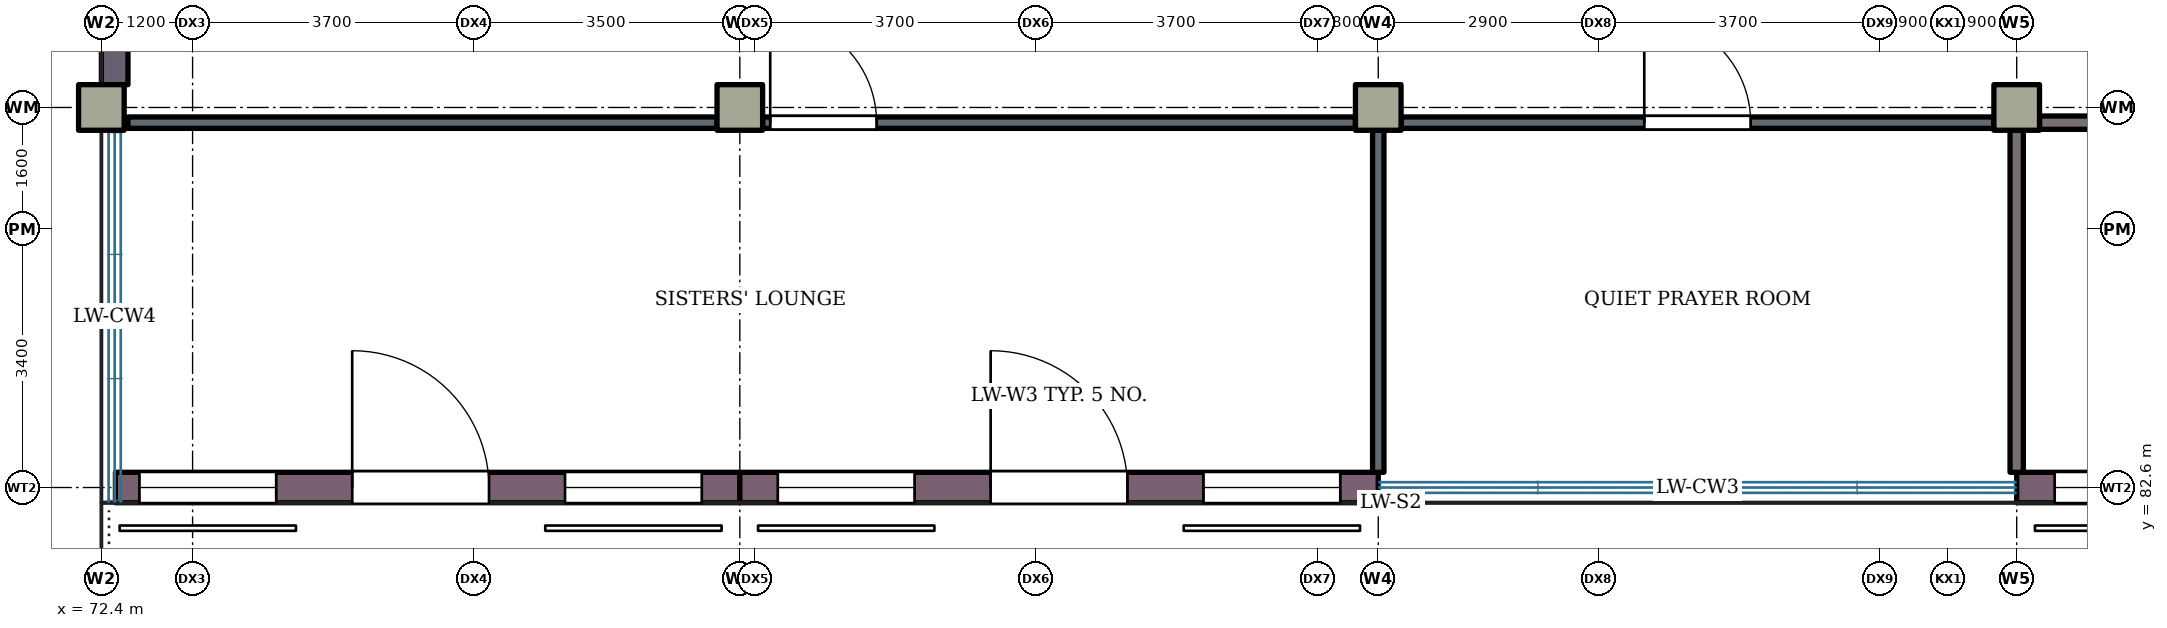
"""IFC4 building model, lengths in metres.
Left out: names, types, materials, properties, quantities, classifications, styles, units other than length and angle.
Written with IfcOpenShell. Run it as: python <this file> out.ifc"""

import sys

from ifc_helpers import new_model, si_unit, direction, frame, frame_2d, origin, origin_2d, place, context, subcontext, project, spatial, rectangle, extrude, element, fill, save


model = new_model("IFC4")
c1 = context("Model", 3, precision=1e-05, world=origin(), true_north=direction((0.0, 1.0)))
c2 = subcontext(c1, "Body", "Model", "MODEL_VIEW")
j1 = project(units=[si_unit("LENGTHUNIT", "METRE"), si_unit("PLANEANGLEUNIT", "RADIAN")], contexts=[c1])
p1 = place(None, origin())
s1 = spatial("IfcSite", under=j1, at=p1, CompositionType="ELEMENT")
p2 = place(p1, origin())
s2 = spatial("IfcBuilding", under=s1, at=p2, CompositionType="ELEMENT")
p3 = place(p2, frame((0.0, 0.0, 12.6)))
s3 = spatial("IfcBuildingStorey", under=s2, at=p3, CompositionType="ELEMENT", Elevation=12.6)
for number, where, z_axis, x_axis in (
    (1, (72.4, 87.6, 0.0), (0.0, 0.0, 1.0), (1.0, 0.0, 0.0)),
    (2, (80.8, 87.6, 0.0), (0.0, 0.0, 1.0), (1.0, 0.0, 0.0)),
    (3, (89.2, 87.6, 0.0), (0.0, 0.0, 1.0), (1.0, 0.0, 0.0)),
    (4, (97.6, 87.6, 0.0), (0.0, 0.0, 1.0), (1.0, 0.0, 0.0)),
):
    element("IfcColumn", number, at=place(p3, frame(where, z_axis=z_axis, x_axis=x_axis)), inside=s3, PredefinedType="COLUMN", context=c2, shape_type="SweptSolid", body=[
        extrude(rectangle(XDim=0.6, YDim=0.6, at=origin_2d()), origin(), (0.0, 0.0, 1.0), 4.2),
    ])
p4 = place(p3, frame((72.575, 87.9, 0.0), z_axis=(0.0, 0.0, 1.0), x_axis=(0.0, 1.0, 0.0)))
e5 = element("IfcWall", 5, at=p4, inside=s3, PredefinedType="SHEAR", context=c2, shape_type="SweptSolid", body=[
    extrude(rectangle(XDim=9.6, YDim=0.35, at=frame_2d((4.8, 0.0))), origin(), (0.0, 0.0, 1.0), 4.2),
])
p5 = place(p4, frame((5.3, 0.0, 0.9)))
e6 = element("IfcOpeningElement", 6, at=p5, cuts=e5, PredefinedType="OPENING", context=c2, shape_type="SweptSolid", body=[
    extrude(rectangle(XDim=1.8, YDim=2.1, at=frame_2d((0.9, 1.05))), frame((0.0, 0.185, 0.0), z_axis=(0.0, -1.0, 0.0), x_axis=(1.0, 0.0, 0.0)), (0.0, 0.0, 1.0), 0.37),
])
p6 = place(p3, frame((72.585, 82.6, 0.0), z_axis=(0.0, 0.0, 1.0), x_axis=(1.0, 0.0, 0.0)))
e7 = element("IfcWall", 7, at=p6, inside=s3, PredefinedType="SOLIDWALL", context=c2, shape_type="SweptSolid", body=[
    extrude(rectangle(XDim=8.215, YDim=0.4, at=frame_2d((4.107, 0.0))), origin(), (0.0, 0.0, 1.0), 3.32),
])
p7 = place(p6, frame((3.115, 0.0, 0.0)))
e8 = element("IfcOpeningElement", 8, at=p7, cuts=e7, PredefinedType="OPENING", context=c2, shape_type="SweptSolid", body=[
    extrude(rectangle(XDim=1.8, YDim=2.4, at=frame_2d((0.9, 1.2))), frame((0.0, 0.21, 0.0), z_axis=(0.0, -1.0, 0.0), x_axis=(1.0, 0.0, 0.0)), (0.0, 0.0, 1.0), 0.42),
])
p8 = place(p6, frame((0.315, 0.0, 0.9)))
e9 = element("IfcOpeningElement", 9, at=p8, cuts=e7, PredefinedType="OPENING", context=c2, shape_type="SweptSolid", body=[
    extrude(rectangle(XDim=1.8, YDim=1.9, at=frame_2d((0.9, 0.95))), frame((0.0, 0.21, 0.0), z_axis=(0.0, -1.0, 0.0), x_axis=(1.0, 0.0, 0.0)), (0.0, 0.0, 1.0), 0.42),
])
p9 = place(p6, frame((5.915, 0.0, 0.9)))
e10 = element("IfcOpeningElement", 10, at=p9, cuts=e7, PredefinedType="OPENING", context=c2, shape_type="SweptSolid", body=[
    extrude(rectangle(XDim=1.8, YDim=1.9, at=frame_2d((0.9, 0.95))), frame((0.0, 0.21, 0.0), z_axis=(0.0, -1.0, 0.0), x_axis=(1.0, 0.0, 0.0)), (0.0, 0.0, 1.0), 0.42),
])
p10 = place(p3, frame((80.8, 82.6, 0.0), z_axis=(0.0, 0.0, 1.0), x_axis=(1.0, 0.0, 0.0)))
e11 = element("IfcWall", 11, at=p10, inside=s3, PredefinedType="SOLIDWALL", context=c2, shape_type="SweptSolid", body=[
    extrude(rectangle(XDim=8.4, YDim=0.4, at=frame_2d((4.2, 0.0))), origin(), (0.0, 0.0, 1.0), 3.32),
])
p11 = place(p10, frame((3.3, 0.0, 0.0)))
e12 = element("IfcOpeningElement", 12, at=p11, cuts=e11, PredefinedType="OPENING", context=c2, shape_type="SweptSolid", body=[
    extrude(rectangle(XDim=1.8, YDim=2.4, at=frame_2d((0.9, 1.2))), frame((0.0, 0.21, 0.0), z_axis=(0.0, -1.0, 0.0), x_axis=(1.0, 0.0, 0.0)), (0.0, 0.0, 1.0), 0.42),
])
p12 = place(p10, frame((0.5, 0.0, 0.9)))
e13 = element("IfcOpeningElement", 13, at=p12, cuts=e11, PredefinedType="OPENING", context=c2, shape_type="SweptSolid", body=[
    extrude(rectangle(XDim=1.8, YDim=1.9, at=frame_2d((0.9, 0.95))), frame((0.0, 0.21, 0.0), z_axis=(0.0, -1.0, 0.0), x_axis=(1.0, 0.0, 0.0)), (0.0, 0.0, 1.0), 0.42),
])
p13 = place(p10, frame((6.1, 0.0, 0.9)))
e14 = element("IfcOpeningElement", 14, at=p13, cuts=e11, PredefinedType="OPENING", context=c2, shape_type="SweptSolid", body=[
    extrude(rectangle(XDim=1.8, YDim=1.9, at=frame_2d((0.9, 0.95))), frame((0.0, 0.21, 0.0), z_axis=(0.0, -1.0, 0.0), x_axis=(1.0, 0.0, 0.0)), (0.0, 0.0, 1.0), 0.42),
])
p14 = place(p3, frame((97.6, 82.6, 0.0), z_axis=(0.0, 0.0, 1.0), x_axis=(1.0, 0.0, 0.0)))
e15 = element("IfcWall", 15, at=p14, inside=s3, PredefinedType="SOLIDWALL", context=c2, shape_type="SweptSolid", body=[
    extrude(rectangle(XDim=8.4, YDim=0.4, at=frame_2d((4.2, 0.0))), origin(), (0.0, 0.0, 1.0), 3.32),
])
p15 = place(p14, frame((3.3, 0.0, 0.0)))
e16 = element("IfcOpeningElement", 16, at=p15, cuts=e15, PredefinedType="OPENING", context=c2, shape_type="SweptSolid", body=[
    extrude(rectangle(XDim=1.8, YDim=2.4, at=frame_2d((0.9, 1.2))), frame((0.0, 0.21, 0.0), z_axis=(0.0, -1.0, 0.0), x_axis=(1.0, 0.0, 0.0)), (0.0, 0.0, 1.0), 0.42),
])
p16 = place(p14, frame((0.5, 0.0, 0.9)))
e17 = element("IfcOpeningElement", 17, at=p16, cuts=e15, PredefinedType="OPENING", context=c2, shape_type="SweptSolid", body=[
    extrude(rectangle(XDim=1.8, YDim=1.9, at=frame_2d((0.9, 0.95))), frame((0.0, 0.21, 0.0), z_axis=(0.0, -1.0, 0.0), x_axis=(1.0, 0.0, 0.0)), (0.0, 0.0, 1.0), 0.42),
])
p17 = place(p14, frame((6.1, 0.0, 0.9)))
e18 = element("IfcOpeningElement", 18, at=p17, cuts=e15, PredefinedType="OPENING", context=c2, shape_type="SweptSolid", body=[
    extrude(rectangle(XDim=1.8, YDim=1.9, at=frame_2d((0.9, 0.95))), frame((0.0, 0.21, 0.0), z_axis=(0.0, -1.0, 0.0), x_axis=(1.0, 0.0, 0.0)), (0.0, 0.0, 1.0), 0.42),
])
p18 = place(p3, frame((97.9, 87.4, 0.0), z_axis=(0.0, 0.0, 1.0), x_axis=(1.0, 0.0, 0.0)))
e19 = element("IfcWall", 19, at=p18, inside=s3, PredefinedType="PARTITIONING", context=c2, shape_type="SweptSolid", body=[
    extrude(rectangle(XDim=7.8, YDim=0.175, at=frame_2d((3.9, 0.0))), origin(), (0.0, 0.0, 1.0), 3.12),
])
p19 = place(p3, frame((72.75, 87.4, 0.0), z_axis=(0.0, 0.0, 1.0), x_axis=(1.0, 0.0, 0.0)))
e20 = element("IfcWall", 20, at=p19, inside=s3, PredefinedType="PARTITIONING", context=c2, shape_type="SweptSolid", body=[
    extrude(rectangle(XDim=7.75, YDim=0.15, at=frame_2d((3.875, 0.0))), origin(), (0.0, 0.0, 1.0), 3.12),
])
p20 = place(p3, frame((81.1, 87.4, 0.0), z_axis=(0.0, 0.0, 1.0), x_axis=(1.0, 0.0, 0.0)))
e21 = element("IfcWall", 21, at=p20, inside=s3, PredefinedType="PARTITIONING", context=c2, shape_type="SweptSolid", body=[
    extrude(rectangle(XDim=7.8, YDim=0.15, at=frame_2d((3.9, 0.0))), origin(), (0.0, 0.0, 1.0), 3.12),
])
p21 = place(p20, frame((0.1, 0.0, 0.0)))
e22 = element("IfcOpeningElement", 22, at=p21, cuts=e21, PredefinedType="OPENING", context=c2, shape_type="SweptSolid", body=[
    extrude(rectangle(XDim=1.4, YDim=2.1, at=frame_2d((0.7, 1.05))), frame((0.0, 0.085, 0.0), z_axis=(0.0, -1.0, 0.0), x_axis=(1.0, 0.0, 0.0)), (0.0, 0.0, 1.0), 0.17),
])
p22 = place(p3, frame((89.5, 87.4, 0.0), z_axis=(0.0, 0.0, 1.0), x_axis=(1.0, 0.0, 0.0)))
e23 = element("IfcWall", 23, at=p22, inside=s3, PredefinedType="PARTITIONING", context=c2, shape_type="SweptSolid", body=[
    extrude(rectangle(XDim=7.8, YDim=0.15, at=frame_2d((3.9, 0.0))), origin(), (0.0, 0.0, 1.0), 3.12),
])
p23 = place(p22, frame((3.2, 0.0, 0.0)))
e24 = element("IfcOpeningElement", 24, at=p23, cuts=e23, PredefinedType="OPENING", context=c2, shape_type="SweptSolid", body=[
    extrude(rectangle(XDim=1.4, YDim=2.1, at=frame_2d((0.7, 1.05))), frame((0.0, 0.085, 0.0), z_axis=(0.0, -1.0, 0.0), x_axis=(1.0, 0.0, 0.0)), (0.0, 0.0, 1.0), 0.17),
])
p24 = place(p3, frame((89.2, 82.8, 0.0), z_axis=(0.0, 0.0, 1.0), x_axis=(0.0, 1.0, 0.0)))
e25 = element("IfcWall", 25, at=p24, inside=s3, PredefinedType="PARTITIONING", context=c2, shape_type="SweptSolid", body=[
    extrude(rectangle(XDim=4.5, YDim=0.15, at=frame_2d((2.25, 0.0))), origin(), (0.0, 0.0, 1.0), 3.02),
])
p25 = place(p3, frame((97.6, 82.8, 0.0), z_axis=(0.0, 0.0, 1.0), x_axis=(0.0, 1.0, 0.0)))
e26 = element("IfcWall", 26, at=p25, inside=s3, PredefinedType="PARTITIONING", context=c2, shape_type="SweptSolid", body=[
    extrude(rectangle(XDim=4.5, YDim=0.175, at=frame_2d((2.25, 0.0))), origin(), (0.0, 0.0, 1.0), 3.02),
])
p26 = place(p7, origin())
e27 = element("IfcDoor", 27, at=p26, inside=s3, OperationType="DOUBLE_DOOR_SINGLE_SWING", PredefinedType="DOOR", context=c2, shape_type="SweptSolid", body=[
    extrude(rectangle(XDim=1.8, YDim=2.4, at=frame_2d((0.9, 1.2))), frame((0.0, 0.025, 0.0), z_axis=(0.0, -1.0, 0.0), x_axis=(1.0, 0.0, 0.0)), (0.0, 0.0, 1.0), 0.05),
])
fill(e8, e27)
p27 = place(p8, origin())
e28 = element("IfcWindow", 28, at=p27, inside=s3, PartitioningType="SINGLE_PANEL", PredefinedType="WINDOW", context=c2, shape_type="SweptSolid", body=[
    extrude(rectangle(XDim=1.8, YDim=1.9, at=frame_2d((0.9, 0.95))), frame((0.0, 0.03, 0.0), z_axis=(0.0, -1.0, 0.0), x_axis=(1.0, 0.0, 0.0)), (0.0, 0.0, 1.0), 0.06),
])
fill(e9, e28)
p28 = place(p9, origin())
e29 = element("IfcWindow", 29, at=p28, inside=s3, PartitioningType="SINGLE_PANEL", PredefinedType="WINDOW", context=c2, shape_type="SweptSolid", body=[
    extrude(rectangle(XDim=1.8, YDim=1.9, at=frame_2d((0.9, 0.95))), frame((0.0, 0.03, 0.0), z_axis=(0.0, -1.0, 0.0), x_axis=(1.0, 0.0, 0.0)), (0.0, 0.0, 1.0), 0.06),
])
fill(e10, e29)
p29 = place(p11, origin())
e30 = element("IfcDoor", 30, at=p29, inside=s3, OperationType="DOUBLE_DOOR_SINGLE_SWING", PredefinedType="DOOR", context=c2, shape_type="SweptSolid", body=[
    extrude(rectangle(XDim=1.8, YDim=2.4, at=frame_2d((0.9, 1.2))), frame((0.0, 0.025, 0.0), z_axis=(0.0, -1.0, 0.0), x_axis=(1.0, 0.0, 0.0)), (0.0, 0.0, 1.0), 0.05),
])
fill(e12, e30)
p30 = place(p12, origin())
e31 = element("IfcWindow", 31, at=p30, inside=s3, PartitioningType="SINGLE_PANEL", PredefinedType="WINDOW", context=c2, shape_type="SweptSolid", body=[
    extrude(rectangle(XDim=1.8, YDim=1.9, at=frame_2d((0.9, 0.95))), frame((0.0, 0.03, 0.0), z_axis=(0.0, -1.0, 0.0), x_axis=(1.0, 0.0, 0.0)), (0.0, 0.0, 1.0), 0.06),
])
fill(e13, e31)
p31 = place(p13, origin())
e32 = element("IfcWindow", 32, at=p31, inside=s3, PartitioningType="SINGLE_PANEL", PredefinedType="WINDOW", context=c2, shape_type="SweptSolid", body=[
    extrude(rectangle(XDim=1.8, YDim=1.9, at=frame_2d((0.9, 0.95))), frame((0.0, 0.03, 0.0), z_axis=(0.0, -1.0, 0.0), x_axis=(1.0, 0.0, 0.0)), (0.0, 0.0, 1.0), 0.06),
])
fill(e14, e32)
p32 = place(p16, origin())
e33 = element("IfcWindow", 33, at=p32, inside=s3, PartitioningType="SINGLE_PANEL", PredefinedType="WINDOW", context=c2, shape_type="SweptSolid", body=[
    extrude(rectangle(XDim=1.8, YDim=1.9, at=frame_2d((0.9, 0.95))), frame((0.0, 0.03, 0.0), z_axis=(0.0, -1.0, 0.0), x_axis=(1.0, 0.0, 0.0)), (0.0, 0.0, 1.0), 0.06),
])
fill(e17, e33)
p33 = place(p21, origin())
e34 = element("IfcDoor", 34, at=p33, inside=s3, OperationType="DOUBLE_DOOR_SINGLE_SWING", PredefinedType="DOOR", context=c2, shape_type="SweptSolid", body=[
    extrude(rectangle(XDim=1.4, YDim=2.1, at=frame_2d((0.7, 1.05))), frame((0.0, 0.025, 0.0), z_axis=(0.0, -1.0, 0.0), x_axis=(1.0, 0.0, 0.0)), (0.0, 0.0, 1.0), 0.05),
])
fill(e22, e34)
p34 = place(p23, origin())
e35 = element("IfcDoor", 35, at=p34, inside=s3, OperationType="DOUBLE_DOOR_SINGLE_SWING", PredefinedType="DOOR", context=c2, shape_type="SweptSolid", body=[
    extrude(rectangle(XDim=1.4, YDim=2.1, at=frame_2d((0.7, 1.05))), frame((0.0, 0.025, 0.0), z_axis=(0.0, -1.0, 0.0), x_axis=(1.0, 0.0, 0.0)), (0.0, 0.0, 1.0), 0.05),
])
fill(e24, e35)
save(model, sys.argv[1])
